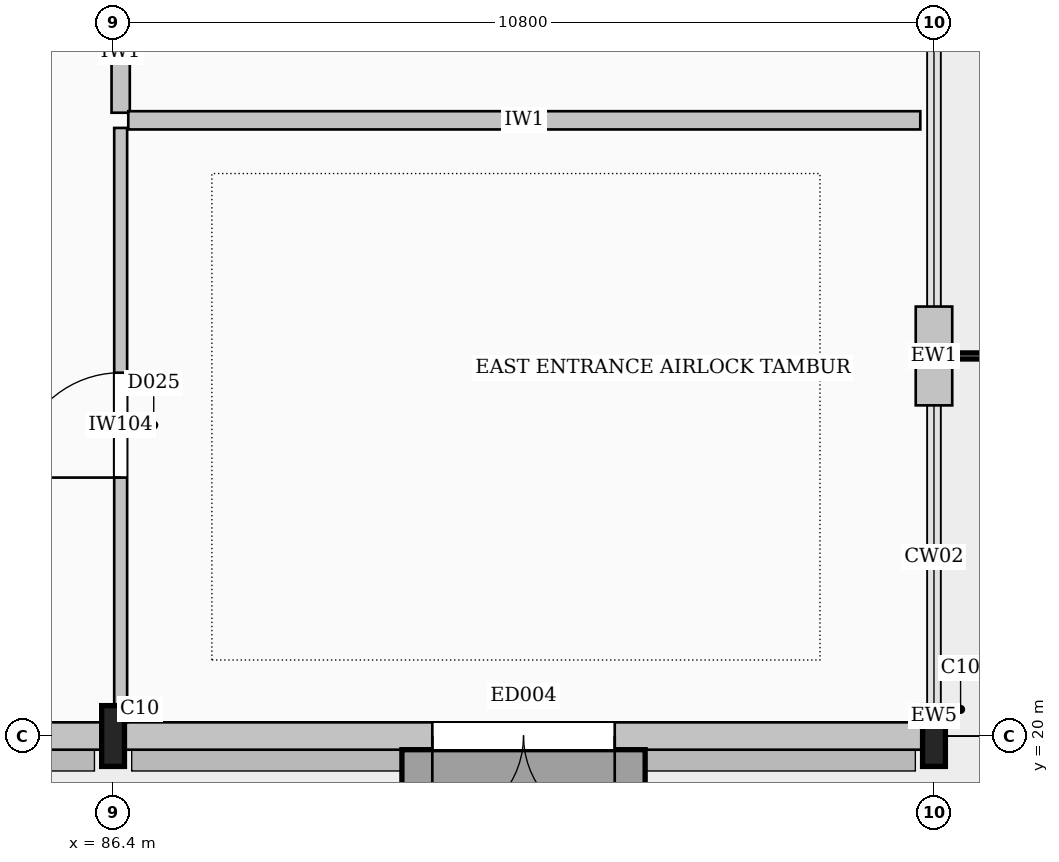
"""IFC4 building model, lengths in metres.
Left out: names, types, materials, properties, quantities, classifications, styles, units other than length and angle.
Written with IfcOpenShell. Run it as: python <this file> out.ifc"""

import sys

from ifc_helpers import new_model, si_unit, direction, frame, frame_2d, origin, origin_2d, place, context, subcontext, project, spatial, rectangle, i_section, extrude, element, fill, save


model = new_model("IFC4")
c1 = context("Model", 3, precision=1e-05, world=origin(), true_north=direction((0.0, 1.0)))
c2 = subcontext(c1, "Body", "Model", "MODEL_VIEW")
j1 = project(units=[si_unit("LENGTHUNIT", "METRE"), si_unit("PLANEANGLEUNIT", "RADIAN")], contexts=[c1])
p1 = place(None, origin())
s1 = spatial("IfcSite", under=j1, at=p1, CompositionType="ELEMENT")
p2 = place(p1, origin())
s2 = spatial("IfcBuilding", under=s1, at=p2, CompositionType="ELEMENT")
p3 = place(p2, origin())
s3 = spatial("IfcBuildingStorey", under=s2, at=p3, CompositionType="ELEMENT", Elevation=0.0)
for number, where, z_axis, x_axis in (
    (1, (86.4, 20.0, 0.0), (0.0, 0.0, 1.0), (1.0, 0.0, 0.0)),
    (2, (97.2, 20.0, 0.0), (0.0, 0.0, 1.0), (1.0, 0.0, 0.0)),
):
    element("IfcColumn", number, at=place(p3, frame(where, z_axis=z_axis, x_axis=x_axis)), inside=s3, PredefinedType="COLUMN", context=c2, shape_type="SweptSolid", body=[
        extrude(i_section(OverallWidth=0.3, OverallDepth=0.8, WebThickness=0.018, FlangeThickness=0.033, FilletRadius=0.03, at=origin_2d()), origin(), (0.0, 0.0, 1.0), 4.8),
    ])
p4 = place(p3, frame((75.745, 20.0, 0.0), z_axis=(0.0, 0.0, 1.0), x_axis=(1.0, 0.0, 0.0)))
e3 = element("IfcWall", 3, at=p4, inside=s3, PredefinedType="STANDARD", context=c2, shape_type="SweptSolid", body=[
    extrude(rectangle(XDim=10.51, YDim=0.36, at=frame_2d((5.255, 0.0))), origin(), (0.0, 0.0, 1.0), 4.36),
])
p5 = place(p4, frame((3.155, 0.0, 0.9)))
e4 = element("IfcOpeningElement", 4, at=p5, cuts=e3, PredefinedType="OPENING", context=c2, shape_type="SweptSolid", body=[
    extrude(rectangle(XDim=4.2, YDim=2.7, at=frame_2d((2.1, 1.35))), frame((0.0, 0.19, 0.0), z_axis=(0.0, -1.0, 0.0), x_axis=(1.0, 0.0, 0.0)), (0.0, 0.0, 1.0), 0.38),
])
p6 = place(p3, frame((86.545, 20.0, 0.0), z_axis=(0.0, 0.0, 1.0), x_axis=(1.0, 0.0, 0.0)))
e5 = element("IfcWall", 5, at=p6, inside=s3, PredefinedType="STANDARD", context=c2, shape_type="SweptSolid", body=[
    extrude(rectangle(XDim=10.51, YDim=0.36, at=frame_2d((5.255, 0.0))), origin(), (0.0, 0.0, 1.0), 4.36),
])
p7 = place(p6, frame((4.055, 0.0, 0.0)))
e6 = element("IfcOpeningElement", 6, at=p7, cuts=e5, PredefinedType="OPENING", context=c2, shape_type="SweptSolid", body=[
    extrude(rectangle(XDim=2.4, YDim=2.6, at=frame_2d((1.2, 1.3))), frame((0.0, 0.19, 0.0), z_axis=(0.0, -1.0, 0.0), x_axis=(1.0, 0.0, 0.0)), (0.0, 0.0, 1.0), 0.38),
])
p8 = place(p3, frame((97.2, 24.35, 0.0), z_axis=(0.0, 0.0, 1.0), x_axis=(0.0, 1.0, 0.0)))
e7 = element("IfcWall", 7, at=p8, inside=s3, PredefinedType="STANDARD", context=c2, shape_type="SweptSolid", body=[
    extrude(rectangle(XDim=1.3, YDim=0.48, at=frame_2d((0.65, 0.0))), origin(), (0.0, 0.0, 1.0), 4.56),
])
p9 = place(p3, frame((97.2, 20.145, 0.0), z_axis=(0.0, 0.0, 1.0), x_axis=(0.0, 1.0, 0.0)))
e8 = element("IfcWall", 8, at=p9, inside=s3, PredefinedType="STANDARD", context=c2, shape_type="SweptSolid", body=[
    extrude(rectangle(XDim=0.225, YDim=0.3, at=frame_2d((0.113, 0.0))), origin(), (0.0, 0.0, 1.0), 4.56),
])
p10 = place(p3, frame((86.5, 20.18, 0.0), z_axis=(0.0, 0.0, 1.0), x_axis=(0.0, 1.0, 0.0)))
e9 = element("IfcWall", 9, at=p10, inside=s3, PredefinedType="PARTITIONING", context=c2, shape_type="SweptSolid", body=[
    extrude(rectangle(XDim=7.82, YDim=0.17, at=frame_2d((3.91, 0.0))), origin(), (0.0, 0.0, 1.0), 4.52),
])
p11 = place(p10, frame((3.22, 0.0, 0.0)))
e10 = element("IfcOpeningElement", 10, at=p11, cuts=e9, PredefinedType="OPENING", context=c2, shape_type="SweptSolid", body=[
    extrude(rectangle(XDim=1.38, YDim=2.38, at=frame_2d((0.69, 1.19))), frame((0.0, 0.095, 0.0), z_axis=(0.0, -1.0, 0.0), x_axis=(1.0, 0.0, 0.0)), (0.0, 0.0, 1.0), 0.19),
])
p12 = place(p3, frame((86.5, 28.2, 0.0), z_axis=(0.0, 0.0, 1.0), x_axis=(0.0, 1.0, 0.0)))
e11 = element("IfcWall", 11, at=p12, inside=s3, PredefinedType="SOLIDWALL", context=c2, shape_type="SweptSolid", body=[
    extrude(rectangle(XDim=1.6, YDim=0.24, at=frame_2d((0.8, 0.0))), origin(), (0.0, 0.0, 1.0), 4.52),
])
p13 = place(p3, frame((86.6, 28.1, 0.0), z_axis=(0.0, 0.0, 1.0), x_axis=(1.0, 0.0, 0.0)))
e12 = element("IfcWall", 12, at=p13, inside=s3, PredefinedType="SOLIDWALL", context=c2, shape_type="SweptSolid", body=[
    extrude(rectangle(XDim=10.42, YDim=0.24, at=frame_2d((5.21, 0.0))), origin(), (0.0, 0.0, 1.0), 4.52),
])
p14 = place(p7, frame((2.4, 0.0, 0.0), z_axis=(0.0, 0.0, 1.0), x_axis=(-1.0, 0.0, 0.0)))
e13 = element("IfcDoor", 13, at=p14, inside=s3, OperationType="DOUBLE_DOOR_SINGLE_SWING", PredefinedType="DOOR", context=c2, shape_type="SweptSolid", body=[
    extrude(rectangle(XDim=2.4, YDim=2.6, at=frame_2d((1.2, 1.3))), frame((0.0, 0.025, 0.0), z_axis=(0.0, -1.0, 0.0), x_axis=(1.0, 0.0, 0.0)), (0.0, 0.0, 1.0), 0.05),
])
fill(e6, e13)
p15 = place(p11, origin())
e14 = element("IfcDoor", 14, at=p15, inside=s3, OperationType="SINGLE_SWING_LEFT", PredefinedType="DOOR", context=c2, shape_type="SweptSolid", body=[
    extrude(rectangle(XDim=1.38, YDim=2.38, at=frame_2d((0.69, 1.19))), frame((0.0, 0.025, 0.0), z_axis=(0.0, -1.0, 0.0), x_axis=(1.0, 0.0, 0.0)), (0.0, 0.0, 1.0), 0.05),
])
fill(e10, e14)
save(model, sys.argv[1])
